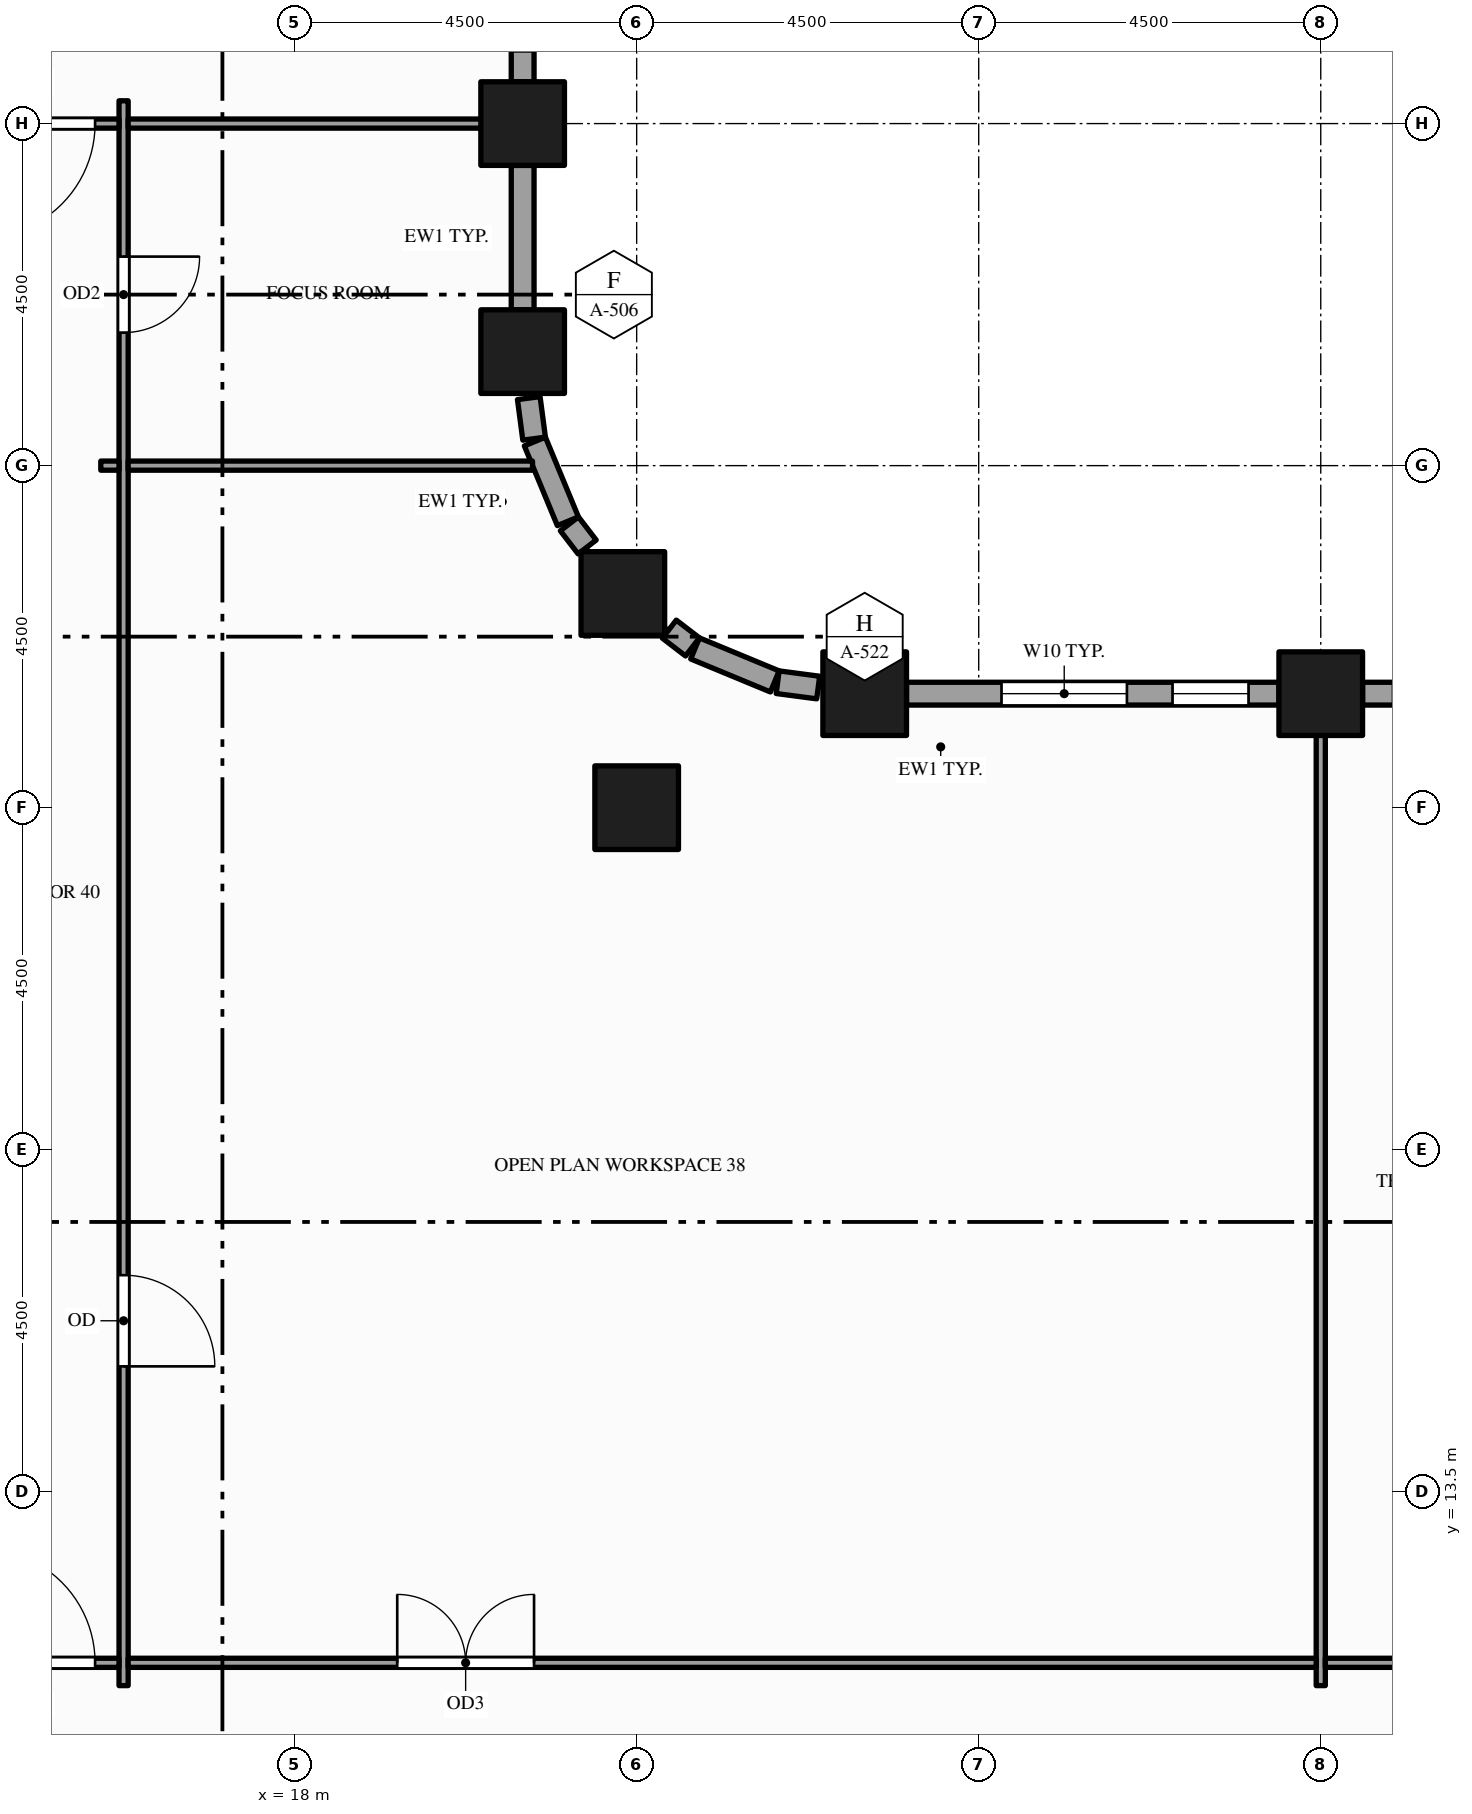
"""IFC4 building model, lengths in metres.
Left out: names, types, materials, properties, quantities, classifications, styles, units other than length and angle.
Written with IfcOpenShell. Run it as: python <this file> out.ifc"""

import sys

from ifc_helpers import new_model, si_unit, direction, frame, frame_2d, origin, origin_2d, place, context, subcontext, project, spatial, rectangle, hollow_rectangle, extrude, element, fill, save


model = new_model("IFC4")
c1 = context("Model", 3, precision=1e-05, world=origin(), true_north=direction((0.0, 1.0)))
c2 = subcontext(c1, "Body", "Model", "MODEL_VIEW")
j1 = project(units=[si_unit("LENGTHUNIT", "METRE"), si_unit("PLANEANGLEUNIT", "RADIAN")], contexts=[c1])
p1 = place(None, origin())
s1 = spatial("IfcSite", under=j1, at=p1, CompositionType="ELEMENT")
p2 = place(p1, origin())
s2 = spatial("IfcBuilding", under=s1, at=p2, CompositionType="ELEMENT")
p3 = place(p2, frame((0.0, 0.0, 61.0)))
s3 = spatial("IfcBuildingStorey", under=s2, at=p3, CompositionType="ELEMENT", Elevation=61.0)
for number, where, z_axis, x_axis in (
    (1, (21.0, 28.5, -0.15), (0.0, 0.0, 1.0), (1.0, 0.0, 0.0)),
    (2, (21.0, 31.5, -0.15), (0.0, 0.0, 1.0), (1.0, 0.0, 0.0)),
    (3, (22.318, 25.318, -0.15), (0.0, 0.0, 1.0), (1.0, 0.0, 0.0)),
    (4, (22.5, 22.5, -0.15), (0.0, 0.0, 1.0), (1.0, 0.0, 0.0)),
    (5, (25.5, 24.0, -0.15), (0.0, 0.0, 1.0), (1.0, 0.0, 0.0)),
    (6, (31.5, 24.0, -0.15), (0.0, 0.0, 1.0), (1.0, 0.0, 0.0)),
):
    element("IfcColumn", number, at=place(p3, frame(where, z_axis=z_axis, x_axis=x_axis)), inside=s3, PredefinedType="COLUMN", context=c2, shape_type="SweptSolid", body=[
        extrude(hollow_rectangle(XDim=1.1, YDim=1.1, WallThickness=0.06, at=origin_2d()), origin(), (0.0, 0.0, 1.0), 4.0),
    ])
p4 = place(p3, frame((35.45, 24.0, 0.0), z_axis=(0.0, 0.0, 1.0), x_axis=(-1.0, 0.0, 0.0)))
e7 = element("IfcWall", 7, at=p4, inside=s3, PredefinedType="STANDARD", context=c2, shape_type="SweptSolid", body=[
    extrude(rectangle(XDim=3.4, YDim=0.3, at=frame_2d((1.7, 0.0))), origin(), (0.0, 0.0, 1.0), 3.144),
])
p5 = place(p4, frame((0.4, 0.0, 0.9)))
e8 = element("IfcOpeningElement", 8, at=p5, cuts=e7, PredefinedType="OPENING", context=c2, shape_type="SweptSolid", body=[
    extrude(rectangle(XDim=1.0, YDim=2.0, at=frame_2d((0.5, 1.0))), frame((0.0, 0.16, 0.0), z_axis=(0.0, -1.0, 0.0), x_axis=(1.0, 0.0, 0.0)), (0.0, 0.0, 1.0), 0.32),
])
p6 = place(p4, frame((2.0, 0.0, 0.9)))
e9 = element("IfcOpeningElement", 9, at=p6, cuts=e7, PredefinedType="OPENING", context=c2, shape_type="SweptSolid", body=[
    extrude(rectangle(XDim=1.0, YDim=2.0, at=frame_2d((0.5, 1.0))), frame((0.0, 0.16, 0.0), z_axis=(0.0, -1.0, 0.0), x_axis=(1.0, 0.0, 0.0)), (0.0, 0.0, 1.0), 0.32),
])
p7 = place(p3, frame((30.95, 24.0, 0.0), z_axis=(0.0, 0.0, 1.0), x_axis=(-1.0, 0.0, 0.0)))
e10 = element("IfcWall", 10, at=p7, inside=s3, PredefinedType="STANDARD", context=c2, shape_type="SweptSolid", body=[
    extrude(rectangle(XDim=4.9, YDim=0.3, at=frame_2d((2.45, 0.0))), origin(), (0.0, 0.0, 1.0), 3.144),
])
p8 = place(p7, frame((0.4, 0.0, 0.9)))
e11 = element("IfcOpeningElement", 11, at=p8, cuts=e10, PredefinedType="OPENING", context=c2, shape_type="SweptSolid", body=[
    extrude(rectangle(XDim=1.0, YDim=2.0, at=frame_2d((0.5, 1.0))), frame((0.0, 0.16, 0.0), z_axis=(0.0, -1.0, 0.0), x_axis=(1.0, 0.0, 0.0)), (0.0, 0.0, 1.0), 0.32),
])
p9 = place(p7, frame((2.0, 0.0, 0.9)))
e12 = element("IfcOpeningElement", 12, at=p9, cuts=e10, PredefinedType="OPENING", context=c2, shape_type="SweptSolid", body=[
    extrude(rectangle(XDim=1.65, YDim=2.0, at=frame_2d((0.825, 1.0))), frame((0.0, 0.16, 0.0), z_axis=(0.0, -1.0, 0.0), x_axis=(1.0, 0.0, 0.0)), (0.0, 0.0, 1.0), 0.32),
])
p10 = place(p3, frame((24.888, 24.081, 0.0), z_axis=(0.0, 0.0, 1.0), x_axis=(-0.991417173479, 0.130736330569, 0.0)))
e13 = element("IfcWall", 13, at=p10, inside=s3, PredefinedType="STANDARD", context=c2, shape_type="SweptSolid", body=[
    extrude(rectangle(XDim=0.538, YDim=0.3, at=frame_2d((0.269, 0.0))), origin(), (0.0, 0.0, 1.0), 2.938),
])
p11 = place(p3, frame((24.317, 24.161, 0.0), z_axis=(0.0, 0.0, 1.0), x_axis=(-0.923914616768, 0.382598720491, 0.0)))
e14 = element("IfcWall", 14, at=p11, inside=s3, PredefinedType="STANDARD", context=c2, shape_type="SweptSolid", body=[
    extrude(rectangle(XDim=1.135, YDim=0.3, at=frame_2d((0.568, 0.0))), origin(), (0.0, 0.0, 1.0), 3.144),
])
for number, where, z_axis, x_axis in (
    (15, (23.234, 24.615, 0.0), (0.0, 0.0, 1.0), (-0.794, 0.609, 0.0)),
    (16, (21.849, 25.93, 0.0), (0.0, 0.0, 1.0), (-0.609, 0.794, 0.0)),
):
    element("IfcWall", number, at=place(p3, frame(where, z_axis=z_axis, x_axis=x_axis)), inside=s3, PredefinedType="STANDARD", context=c2, shape_type="SweptSolid", body=[
        extrude(rectangle(XDim=0.384, YDim=0.3, at=frame_2d((0.192, 0.0))), origin(), (0.0, 0.0, 1.0), 3.144),
    ])
p12 = place(p3, frame((21.595, 26.268, 0.0), z_axis=(0.0, 0.0, 1.0), x_axis=(-0.382598720491, 0.923914616768, 0.0)))
e17 = element("IfcWall", 17, at=p12, inside=s3, PredefinedType="STANDARD", context=c2, shape_type="SweptSolid", body=[
    extrude(rectangle(XDim=1.135, YDim=0.3, at=frame_2d((0.568, 0.0))), origin(), (0.0, 0.0, 1.0), 3.144),
])
p13 = place(p3, frame((21.151, 27.355, 0.0), z_axis=(0.0, 0.0, 1.0), x_axis=(-0.130736330569, 0.991417173479, 0.0)))
e18 = element("IfcWall", 18, at=p13, inside=s3, PredefinedType="STANDARD", context=c2, shape_type="SweptSolid", body=[
    extrude(rectangle(XDim=0.538, YDim=0.3, at=frame_2d((0.269, 0.0))), origin(), (0.0, 0.0, 1.0), 3.144),
])
p14 = place(p3, frame((21.0, 29.05, 0.0), z_axis=(0.0, 0.0, 1.0), x_axis=(0.0, 1.0, 0.0)))
e19 = element("IfcWall", 19, at=p14, inside=s3, PredefinedType="STANDARD", context=c2, shape_type="SweptSolid", body=[
    extrude(rectangle(XDim=1.9, YDim=0.3, at=frame_2d((0.95, 0.0))), origin(), (0.0, 0.0, 1.0), 3.144),
])
p15 = place(p3, frame((21.0, 32.05, 0.0), z_axis=(0.0, 0.0, 1.0), x_axis=(0.0, 1.0, 0.0)))
e20 = element("IfcWall", 20, at=p15, inside=s3, PredefinedType="STANDARD", context=c2, shape_type="SweptSolid", body=[
    extrude(rectangle(XDim=3.95, YDim=0.3, at=frame_2d((1.975, 0.0))), origin(), (0.0, 0.0, 1.0), 3.144),
])
p16 = place(p15, frame((0.4, 0.0, 0.9)))
e21 = element("IfcOpeningElement", 21, at=p16, cuts=e20, PredefinedType="OPENING", context=c2, shape_type="SweptSolid", body=[
    extrude(rectangle(XDim=1.0, YDim=2.0, at=frame_2d((0.5, 1.0))), frame((0.0, 0.16, 0.0), z_axis=(0.0, -1.0, 0.0), x_axis=(1.0, 0.0, 0.0)), (0.0, 0.0, 1.0), 0.32),
])
p17 = place(p15, frame((2.0, 0.0, 0.9)))
e22 = element("IfcOpeningElement", 22, at=p17, cuts=e20, PredefinedType="OPENING", context=c2, shape_type="SweptSolid", body=[
    extrude(rectangle(XDim=1.55, YDim=2.0, at=frame_2d((0.775, 1.0))), frame((0.0, 0.16, 0.0), z_axis=(0.0, -1.0, 0.0), x_axis=(1.0, 0.0, 0.0)), (0.0, 0.0, 1.0), 0.32),
])
p18 = place(p3, frame((15.75, 10.95, 0.0), z_axis=(0.0, 0.0, 1.0), x_axis=(0.0, 1.0, 0.0)))
e23 = element("IfcWall", 23, at=p18, inside=s3, PredefinedType="PARTITIONING", context=c2, shape_type="SweptSolid", body=[
    extrude(rectangle(XDim=20.85, YDim=0.12, at=frame_2d((10.425, 0.0))), origin(), (0.0, 0.0, 1.0), 2.6),
])
p19 = place(p18, frame((17.8, 0.0, 0.0)))
e24 = element("IfcOpeningElement", 24, at=p19, cuts=e23, PredefinedType="OPENING", context=c2, shape_type="SweptSolid", body=[
    extrude(rectangle(XDim=1.0, YDim=2.1, at=frame_2d((0.5, 1.05))), frame((0.0, 0.07, 0.0), z_axis=(0.0, -1.0, 0.0), x_axis=(1.0, 0.0, 0.0)), (0.0, 0.0, 1.0), 0.14),
])
p20 = place(p18, frame((4.2, 0.0, 0.0)))
e25 = element("IfcOpeningElement", 25, at=p20, cuts=e23, PredefinedType="OPENING", context=c2, shape_type="SweptSolid", body=[
    extrude(rectangle(XDim=1.2, YDim=2.1, at=frame_2d((0.6, 1.05))), frame((0.0, 0.07, 0.0), z_axis=(0.0, -1.0, 0.0), x_axis=(1.0, 0.0, 0.0)), (0.0, 0.0, 1.0), 0.14),
])
p21 = place(p3, frame((31.5, 10.95, 0.0), z_axis=(0.0, 0.0, 1.0), x_axis=(0.0, 1.0, 0.0)))
e26 = element("IfcWall", 26, at=p21, inside=s3, PredefinedType="PARTITIONING", context=c2, shape_type="SweptSolid", body=[
    extrude(rectangle(XDim=12.9, YDim=0.12, at=frame_2d((6.45, 0.0))), origin(), (0.0, 0.0, 1.0), 2.938),
])
p22 = place(p3, frame((13.56, 11.25, 0.0), z_axis=(0.0, 0.0, 1.0), x_axis=(1.0, 0.0, 0.0)))
e27 = element("IfcWall", 27, at=p22, inside=s3, PredefinedType="PARTITIONING", context=c2, shape_type="SweptSolid", body=[
    extrude(rectangle(XDim=2.13, YDim=0.12, at=frame_2d((1.065, 0.0))), origin(), (0.0, 0.0, 1.0), 2.938),
])
p23 = place(p22, frame((0.315, 0.0, 0.0)))
e28 = element("IfcOpeningElement", 28, at=p23, cuts=e27, PredefinedType="OPENING", context=c2, shape_type="SweptSolid", body=[
    extrude(rectangle(XDim=1.5, YDim=2.1, at=frame_2d((0.75, 1.05))), frame((0.0, 0.07, 0.0), z_axis=(0.0, -1.0, 0.0), x_axis=(1.0, 0.0, 0.0)), (0.0, 0.0, 1.0), 0.14),
])
p24 = place(p3, frame((15.81, 11.25, 0.0), z_axis=(0.0, 0.0, 1.0), x_axis=(1.0, 0.0, 0.0)))
e29 = element("IfcWall", 29, at=p24, inside=s3, PredefinedType="PARTITIONING", context=c2, shape_type="SweptSolid", body=[
    extrude(rectangle(XDim=15.63, YDim=0.12, at=frame_2d((7.815, 0.0))), origin(), (0.0, 0.0, 1.0), 2.938),
])
p25 = place(p24, frame((3.54, 0.0, 0.0)))
e30 = element("IfcOpeningElement", 30, at=p25, cuts=e29, PredefinedType="OPENING", context=c2, shape_type="SweptSolid", body=[
    extrude(rectangle(XDim=1.8, YDim=2.1, at=frame_2d((0.9, 1.05))), frame((0.0, 0.07, 0.0), z_axis=(0.0, -1.0, 0.0), x_axis=(1.0, 0.0, 0.0)), (0.0, 0.0, 1.0), 0.14),
])
p26 = place(p3, frame((31.56, 11.25, 0.0), z_axis=(0.0, 0.0, 1.0), x_axis=(1.0, 0.0, 0.0)))
e31 = element("IfcWall", 31, at=p26, inside=s3, PredefinedType="PARTITIONING", context=c2, shape_type="SweptSolid", body=[
    extrude(rectangle(XDim=4.38, YDim=0.12, at=frame_2d((2.19, 0.0))), origin(), (0.0, 0.0, 1.0), 2.938),
])
p27 = place(p26, frame((1.69, 0.0, 0.0)))
e32 = element("IfcOpeningElement", 32, at=p27, cuts=e31, PredefinedType="OPENING", context=c2, shape_type="SweptSolid", body=[
    extrude(rectangle(XDim=1.0, YDim=2.1, at=frame_2d((0.5, 1.05))), frame((0.0, 0.07, 0.0), z_axis=(0.0, -1.0, 0.0), x_axis=(1.0, 0.0, 0.0)), (0.0, 0.0, 1.0), 0.14),
])
p28 = place(p3, frame((15.45, 27.0, 0.0), z_axis=(0.0, 0.0, 1.0), x_axis=(1.0, 0.0, 0.0)))
e33 = element("IfcWall", 33, at=p28, inside=s3, PredefinedType="PARTITIONING", context=c2, shape_type="SweptSolid", body=[
    extrude(rectangle(XDim=0.24, YDim=0.12, at=frame_2d((0.12, 0.0))), origin(), (0.0, 0.0, 1.0), 2.938),
])
p29 = place(p3, frame((15.81, 27.0, 0.0), z_axis=(0.0, 0.0, 1.0), x_axis=(1.0, 0.0, 0.0)))
e34 = element("IfcWall", 34, at=p29, inside=s3, PredefinedType="PARTITIONING", context=c2, shape_type="SweptSolid", body=[
    extrude(rectangle(XDim=5.32, YDim=0.12, at=frame_2d((2.66, 0.0))), origin(), (0.0, 0.0, 1.0), 2.938),
])
p30 = place(p3, frame((13.56, 31.5, 0.0), z_axis=(0.0, 0.0, 1.0), x_axis=(1.0, 0.0, 0.0)))
e35 = element("IfcWall", 35, at=p30, inside=s3, PredefinedType="PARTITIONING", context=c2, shape_type="SweptSolid", body=[
    extrude(rectangle(XDim=2.13, YDim=0.12, at=frame_2d((1.065, 0.0))), origin(), (0.0, 0.0, 1.0), 2.938),
])
p31 = place(p30, frame((0.315, 0.0, 0.0)))
e36 = element("IfcOpeningElement", 36, at=p31, cuts=e35, PredefinedType="OPENING", context=c2, shape_type="SweptSolid", body=[
    extrude(rectangle(XDim=1.5, YDim=2.1, at=frame_2d((0.75, 1.05))), frame((0.0, 0.07, 0.0), z_axis=(0.0, -1.0, 0.0), x_axis=(1.0, 0.0, 0.0)), (0.0, 0.0, 1.0), 0.14),
])
p32 = place(p3, frame((15.81, 31.5, 0.0), z_axis=(0.0, 0.0, 1.0), x_axis=(1.0, 0.0, 0.0)))
e37 = element("IfcWall", 37, at=p32, inside=s3, PredefinedType="PARTITIONING", context=c2, shape_type="SweptSolid", body=[
    extrude(rectangle(XDim=5.04, YDim=0.12, at=frame_2d((2.52, 0.0))), origin(), (0.0, 0.0, 1.0), 2.938),
])
p33 = place(p8, origin())
e38 = element("IfcWindow", 38, at=p33, inside=s3, PartitioningType="SINGLE_PANEL", PredefinedType="WINDOW", context=c2, shape_type="SweptSolid", body=[
    extrude(rectangle(XDim=1.0, YDim=2.0, at=frame_2d((0.5, 1.0))), frame((0.0, 0.03, 0.0), z_axis=(0.0, -1.0, 0.0), x_axis=(1.0, 0.0, 0.0)), (0.0, 0.0, 1.0), 0.06),
])
fill(e11, e38)
p34 = place(p9, origin())
e39 = element("IfcWindow", 39, at=p34, inside=s3, PartitioningType="SINGLE_PANEL", PredefinedType="WINDOW", context=c2, shape_type="SweptSolid", body=[
    extrude(rectangle(XDim=1.65, YDim=2.0, at=frame_2d((0.825, 1.0))), frame((0.0, 0.03, 0.0), z_axis=(0.0, -1.0, 0.0), x_axis=(1.0, 0.0, 0.0)), (0.0, 0.0, 1.0), 0.06),
])
fill(e12, e39)
p35 = place(p25, origin())
e40 = element("IfcDoor", 40, at=p35, inside=s3, OperationType="DOUBLE_DOOR_SINGLE_SWING", PredefinedType="DOOR", context=c2, shape_type="SweptSolid", body=[
    extrude(rectangle(XDim=1.8, YDim=2.1, at=frame_2d((0.9, 1.05))), frame((0.0, 0.025, 0.0), z_axis=(0.0, -1.0, 0.0), x_axis=(1.0, 0.0, 0.0)), (0.0, 0.0, 1.0), 0.05),
])
fill(e30, e40)
p36 = place(p23, origin())
e41 = element("IfcDoor", 41, at=p36, inside=s3, OperationType="SINGLE_SWING_LEFT", PredefinedType="DOOR", context=c2, shape_type="SweptSolid", body=[
    extrude(rectangle(XDim=1.5, YDim=2.1, at=frame_2d((0.75, 1.05))), frame((0.0, 0.025, 0.0), z_axis=(0.0, -1.0, 0.0), x_axis=(1.0, 0.0, 0.0)), (0.0, 0.0, 1.0), 0.05),
])
fill(e28, e41)
p37 = place(p31, origin())
e42 = element("IfcDoor", 42, at=p37, inside=s3, OperationType="SINGLE_SWING_LEFT", PredefinedType="DOOR", context=c2, shape_type="SweptSolid", body=[
    extrude(rectangle(XDim=1.5, YDim=2.1, at=frame_2d((0.75, 1.05))), frame((0.0, 0.025, 0.0), z_axis=(0.0, -1.0, 0.0), x_axis=(1.0, 0.0, 0.0)), (0.0, 0.0, 1.0), 0.05),
])
fill(e36, e42)
p38 = place(p19, origin())
e43 = element("IfcDoor", 43, at=p38, inside=s3, OperationType="SINGLE_SWING_RIGHT", PredefinedType="DOOR", context=c2, shape_type="SweptSolid", body=[
    extrude(rectangle(XDim=1.0, YDim=2.1, at=frame_2d((0.5, 1.05))), frame((0.0, 0.025, 0.0), z_axis=(0.0, -1.0, 0.0), x_axis=(1.0, 0.0, 0.0)), (0.0, 0.0, 1.0), 0.05),
])
fill(e24, e43)
p39 = place(p20, origin())
e44 = element("IfcDoor", 44, at=p39, inside=s3, OperationType="SINGLE_SWING_LEFT", PredefinedType="DOOR", context=c2, shape_type="SweptSolid", body=[
    extrude(rectangle(XDim=1.2, YDim=2.1, at=frame_2d((0.6, 1.05))), frame((0.0, 0.025, 0.0), z_axis=(0.0, -1.0, 0.0), x_axis=(1.0, 0.0, 0.0)), (0.0, 0.0, 1.0), 0.05),
])
fill(e25, e44)
save(model, sys.argv[1])
